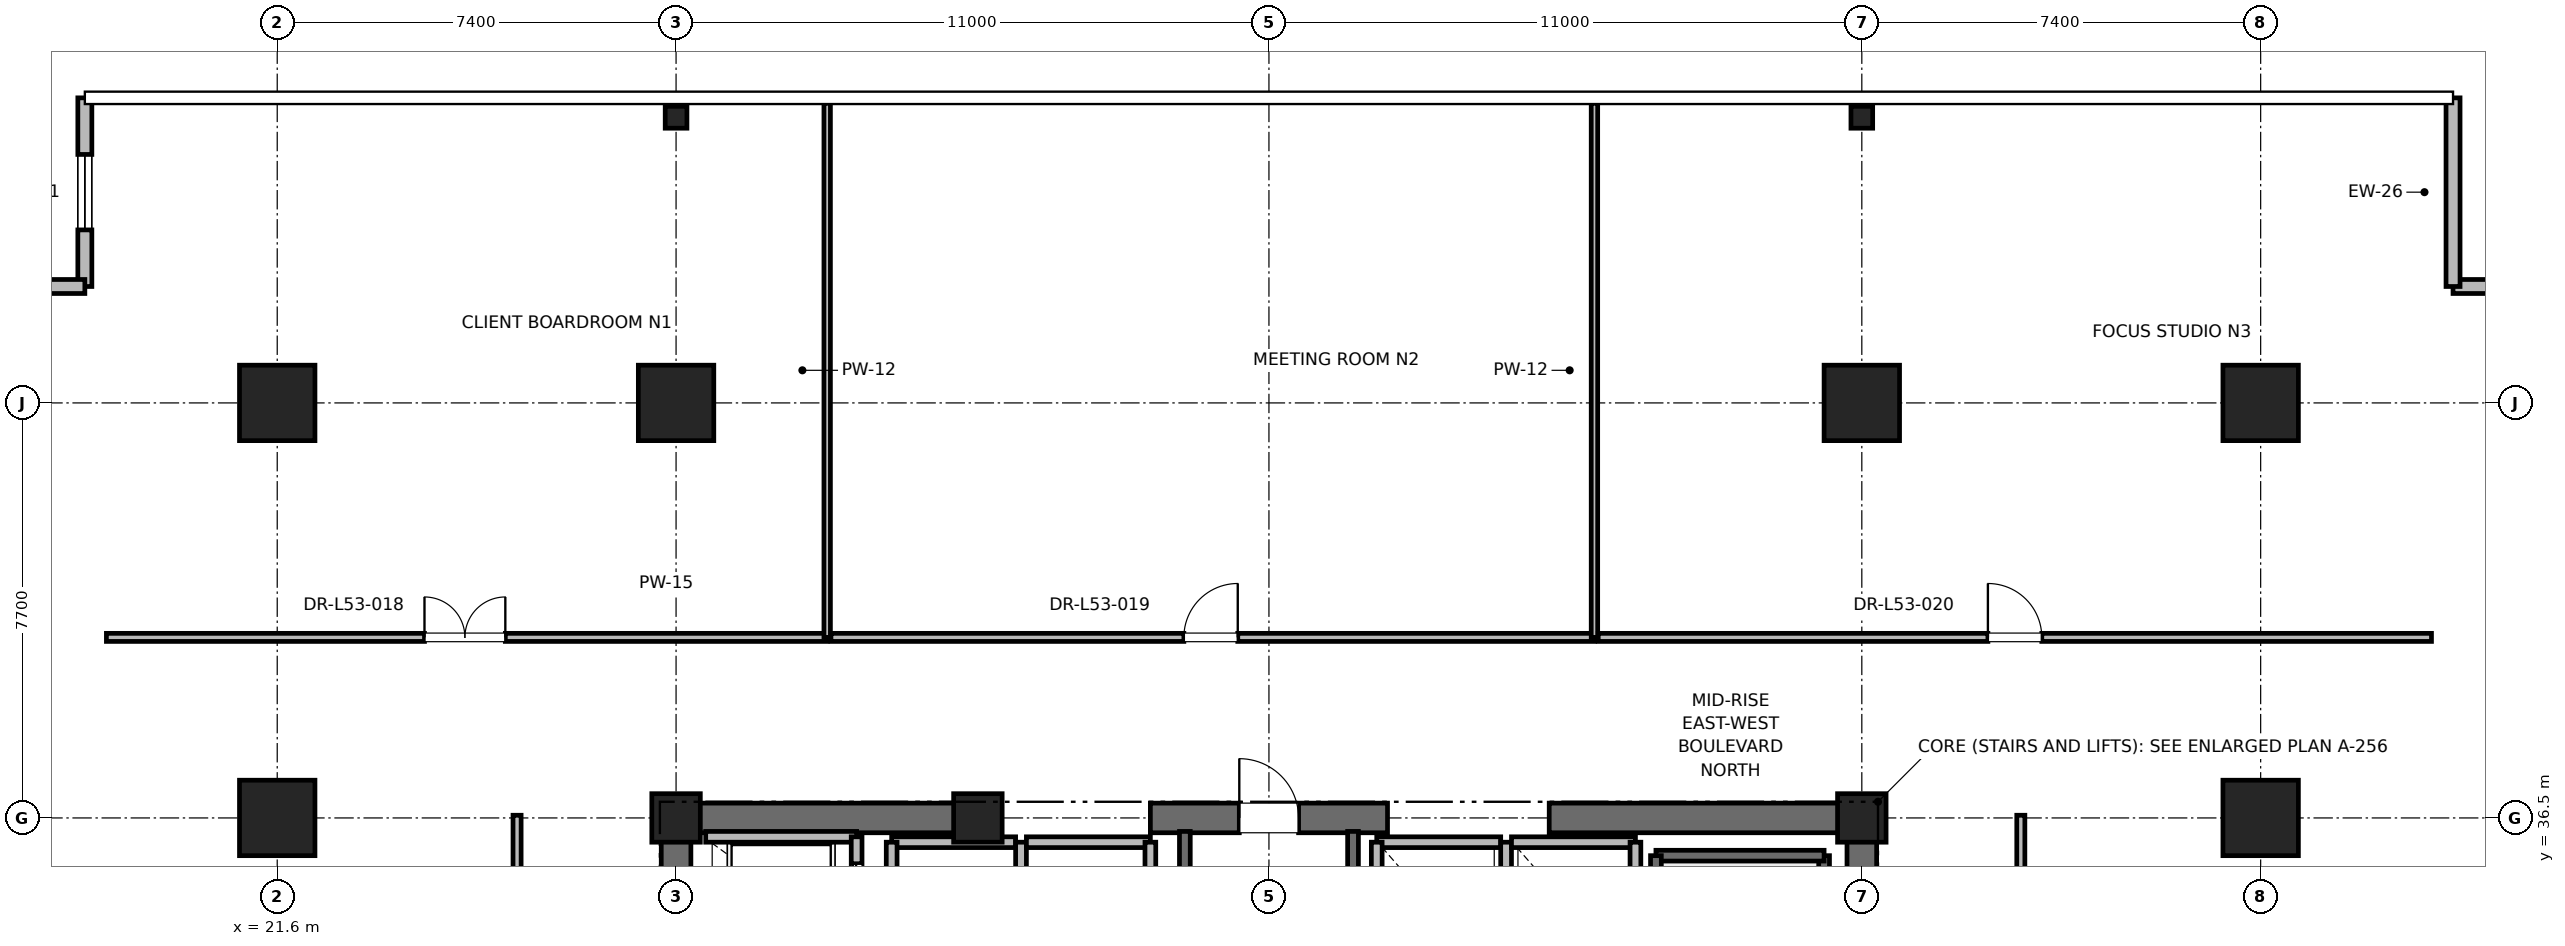
"""IFC4 building model, lengths in metres.
Left out: names, types, materials, properties, quantities, classifications, styles, units other than length and angle.
Written with IfcOpenShell. Run it as: python <this file> out.ifc"""

import sys

from ifc_helpers import new_model, si_unit, direction, frame, frame_2d, origin, origin_2d, place, context, subcontext, project, spatial, rectangle, i_section, extrude, element, fill, save


model = new_model("IFC4")
c1 = context("Model", 3, precision=1e-05, world=origin(), true_north=direction((0.0, 1.0)))
c2 = subcontext(c1, "Body", "Model", "MODEL_VIEW")
j1 = project(units=[si_unit("LENGTHUNIT", "METRE"), si_unit("PLANEANGLEUNIT", "RADIAN")], contexts=[c1])
p1 = place(None, origin())
s1 = spatial("IfcSite", under=j1, at=p1, CompositionType="ELEMENT")
p2 = place(p1, origin())
s2 = spatial("IfcBuilding", under=s1, at=p2, CompositionType="ELEMENT")
p3 = place(p2, frame((0.0, 0.0, 229.2)))
s3 = spatial("IfcBuildingStorey", under=s2, at=p3, CompositionType="ELEMENT", Elevation=229.2)
for number, where, z_axis, x_axis in (
    (1, (29.0, 44.2, 0.0), (0.0, 0.0, 1.0), (1.0, 0.0, 0.0)),
    (2, (51.0, 44.2, 0.0), (0.0, 0.0, 1.0), (1.0, 0.0, 0.0)),
    (3, (21.6, 36.5, 0.0), (0.0, 0.0, 1.0), (1.0, 0.0, 0.0)),
    (4, (58.4, 36.5, 0.0), (0.0, 0.0, 1.0), (1.0, 0.0, 0.0)),
    (5, (21.6, 44.2, 0.0), (0.0, 0.0, 1.0), (1.0, 0.0, 0.0)),
    (6, (58.4, 44.2, 0.0), (0.0, 0.0, 1.0), (1.0, 0.0, 0.0)),
):
    element("IfcColumn", number, at=place(p3, frame(where, z_axis=z_axis, x_axis=x_axis)), inside=s3, PredefinedType="COLUMN", context=c2, shape_type="SweptSolid", body=[
        extrude(rectangle(XDim=1.4, YDim=1.4, at=origin_2d()), origin(), (0.0, 0.0, 1.0), 4.0),
    ])
for number, where, z_axis, x_axis in (
    (7, (29.0, 49.5, 0.0), (0.0, 0.0, 1.0), (1.0, 0.0, 0.0)),
    (8, (51.0, 49.5, 0.0), (0.0, 0.0, 1.0), (1.0, 0.0, 0.0)),
):
    element("IfcColumn", number, at=place(p3, frame(where, z_axis=z_axis, x_axis=x_axis)), inside=s3, PredefinedType="COLUMN", context=c2, shape_type="SweptSolid", body=[
        extrude(i_section(OverallWidth=0.403, OverallDepth=0.406, WebThickness=0.027, FlangeThickness=0.043, FilletRadius=0.015, at=origin_2d()), origin(), (0.0, 0.0, 1.0), 4.0),
    ])
for number, where, z_axis, x_axis in (
    (9, (29.0, 36.5, 0.0), (0.0, 0.0, 1.0), (1.0, 0.0, 0.0)),
    (10, (51.0, 36.5, 0.0), (0.0, 0.0, 1.0), (1.0, 0.0, 0.0)),
    (11, (34.6, 36.5, 0.0), (0.0, 0.0, 1.0), (1.0, 0.0, 0.0)),
):
    element("IfcColumn", number, at=place(p3, frame(where, z_axis=z_axis, x_axis=x_axis)), inside=s3, PredefinedType="PILASTER", context=c2, shape_type="SweptSolid", body=[
        extrude(rectangle(XDim=0.9, YDim=0.9, at=origin_2d()), origin(), (0.0, 0.0, 1.0), 4.0),
    ])
p4 = place(p3, frame((29.0, 36.5, 0.0), z_axis=(0.0, 0.0, 1.0), x_axis=(1.0, 0.0, 0.0)))
e12 = element("IfcWall", 12, at=p4, inside=s3, PredefinedType="SHEAR", context=c2, shape_type="SweptSolid", body=[
    extrude(rectangle(XDim=5.8, YDim=0.55, at=frame_2d((2.9, 0.0))), origin(), (0.0, 0.0, 1.0), 3.7),
])
p5 = place(p3, frame((37.8, 36.5, 0.0), z_axis=(0.0, 0.0, 1.0), x_axis=(1.0, 0.0, 0.0)))
e13 = element("IfcWall", 13, at=p5, inside=s3, PredefinedType="SHEAR", context=c2, shape_type="SweptSolid", body=[
    extrude(rectangle(XDim=4.4, YDim=0.55, at=frame_2d((2.2, 0.0))), origin(), (0.0, 0.0, 1.0), 3.7),
])
p6 = place(p5, frame((1.65, 0.0, 0.0)))
e14 = element("IfcOpeningElement", 14, at=p6, cuts=e13, PredefinedType="OPENING", context=c2, shape_type="SweptSolid", body=[
    extrude(rectangle(XDim=1.1, YDim=2.15, at=frame_2d((0.55, 1.075))), frame((0.0, 0.275, 0.0), z_axis=(0.0, -1.0, 0.0), x_axis=(1.0, 0.0, 0.0)), (0.0, 0.0, 1.0), 0.55),
])
for number, where, z_axis, x_axis in (
    (15, (45.2, 36.5, 0.0), (0.0, 0.0, 1.0), (1.0, 0.0, 0.0)),
    (16, (29.0, 30.7, 0.0), (0.0, 0.0, 1.0), (0.0, 1.0, 0.0)),
):
    element("IfcWall", number, at=place(p3, frame(where, z_axis=z_axis, x_axis=x_axis)), inside=s3, PredefinedType="SHEAR", context=c2, shape_type="SweptSolid", body=[
        extrude(rectangle(XDim=5.8, YDim=0.55, at=frame_2d((2.9, 0.0))), origin(), (0.0, 0.0, 1.0), 3.7),
    ])
p7 = place(p3, frame((51.0, 27.7, 0.0), z_axis=(0.0, 0.0, 1.0), x_axis=(0.0, 1.0, 0.0)))
e17 = element("IfcWall", 17, at=p7, inside=s3, PredefinedType="SHEAR", context=c2, shape_type="SweptSolid", body=[
    extrude(rectangle(XDim=8.8, YDim=0.55, at=frame_2d((4.4, 0.0))), origin(), (0.0, 0.0, 1.0), 3.7),
])
p8 = place(p3, frame((65.969, 46.36, 0.0), z_axis=(0.0, 0.0, 1.0), x_axis=(-1.0, 0.0, 0.0)))
e18 = element("IfcWall", 18, at=p8, inside=s3, PredefinedType="PARAPET", context=c2, shape_type="SweptSolid", body=[
    extrude(rectangle(XDim=4.0, YDim=0.26, at=frame_2d((2.0, 0.0))), origin(), (0.0, 0.0, 1.0), 3.7),
])
p9 = place(p8, frame((1.3, 0.0, 0.85)))
e19 = element("IfcOpeningElement", 19, at=p9, cuts=e18, PredefinedType="OPENING", context=c2, shape_type="SweptSolid", body=[
    extrude(rectangle(XDim=1.4, YDim=2.0, at=frame_2d((0.7, 1.0))), frame((0.0, 0.13, 0.0), z_axis=(0.0, -1.0, 0.0), x_axis=(1.0, 0.0, 0.0)), (0.0, 0.0, 1.0), 0.26),
])
p10 = place(p3, frame((61.969, 46.36, 0.0), z_axis=(0.0, 0.0, 1.0), x_axis=(0.0, 1.0, 0.0)))
e20 = element("IfcWall", 20, at=p10, inside=s3, PredefinedType="PARAPET", context=c2, shape_type="SweptSolid", body=[
    extrude(rectangle(XDim=3.5, YDim=0.26, at=frame_2d((1.75, 0.0))), origin(), (0.0, 0.0, 1.0), 3.7),
])
p11 = place(p3, frame((18.031, 49.86, 0.0), z_axis=(0.0, 0.0, 1.0), x_axis=(0.0, -1.0, 0.0)))
e21 = element("IfcWall", 21, at=p11, inside=s3, PredefinedType="PARAPET", context=c2, shape_type="SweptSolid", body=[
    extrude(rectangle(XDim=3.5, YDim=0.26, at=frame_2d((1.75, 0.0))), origin(), (0.0, 0.0, 1.0), 3.7),
])
p12 = place(p11, frame((1.05, 0.0, 0.85)))
e22 = element("IfcOpeningElement", 22, at=p12, cuts=e21, PredefinedType="OPENING", context=c2, shape_type="SweptSolid", body=[
    extrude(rectangle(XDim=1.4, YDim=2.0, at=frame_2d((0.7, 1.0))), frame((0.0, 0.13, 0.0), z_axis=(0.0, -1.0, 0.0), x_axis=(1.0, 0.0, 0.0)), (0.0, 0.0, 1.0), 0.26),
])
p13 = place(p3, frame((18.031, 46.36, 0.0), z_axis=(0.0, 0.0, 1.0), x_axis=(-1.0, 0.0, 0.0)))
e23 = element("IfcWall", 23, at=p13, inside=s3, PredefinedType="PARAPET", context=c2, shape_type="SweptSolid", body=[
    extrude(rectangle(XDim=4.0, YDim=0.26, at=frame_2d((2.0, 0.0))), origin(), (0.0, 0.0, 1.0), 3.7),
])
p14 = place(p3, frame((50.3, 27.65, 0.0), z_axis=(0.0, 0.0, 1.0), x_axis=(0.0, 1.0, 0.0)))
e24 = element("IfcWall", 24, at=p14, inside=s3, PredefinedType="SOLIDWALL", context=c2, shape_type="SweptSolid", body=[
    extrude(rectangle(XDim=8.15, YDim=0.2, at=frame_2d((4.075, 0.0))), origin(), (0.0, 0.0, 1.0), 3.7),
])
p15 = place(p3, frame((47.18, 35.8, 0.0), z_axis=(0.0, 0.0, 1.0), x_axis=(1.0, 0.0, 0.0)))
e25 = element("IfcWall", 25, at=p15, inside=s3, PredefinedType="SOLIDWALL", context=c2, shape_type="SweptSolid", body=[
    extrude(rectangle(XDim=3.12, YDim=0.2, at=frame_2d((1.56, 0.0))), origin(), (0.0, 0.0, 1.0), 3.7),
])
p16 = place(p3, frame((47.18, 27.62, 0.0), z_axis=(0.0, 0.0, 1.0), x_axis=(0.0, 1.0, 0.0)))
e26 = element("IfcWall", 26, at=p16, inside=s3, PredefinedType="SOLIDWALL", context=c2, shape_type="SweptSolid", body=[
    extrude(rectangle(XDim=8.18, YDim=0.2, at=frame_2d((4.09, 0.0))), origin(), (0.0, 0.0, 1.0), 3.7),
])
p17 = place(p3, frame((38.44, 27.38, 0.0), z_axis=(0.0, 0.0, 1.0), x_axis=(0.0, 1.0, 0.0)))
e27 = element("IfcWall", 27, at=p17, inside=s3, PredefinedType="SOLIDWALL", context=c2, shape_type="SweptSolid", body=[
    extrude(rectangle(XDim=8.87, YDim=0.2, at=frame_2d((4.435, 0.0))), origin(), (0.0, 0.0, 1.0), 3.7),
])
p18 = place(p3, frame((41.56, 27.68, 0.0), z_axis=(0.0, 0.0, 1.0), x_axis=(0.0, 1.0, 0.0)))
e28 = element("IfcWall", 28, at=p18, inside=s3, PredefinedType="SOLIDWALL", context=c2, shape_type="SweptSolid", body=[
    extrude(rectangle(XDim=8.57, YDim=0.2, at=frame_2d((4.285, 0.0))), origin(), (0.0, 0.0, 1.0), 3.7),
])
p19 = place(p3, frame((32.35, 36.15, 0.0), z_axis=(0.0, 0.0, 1.0), x_axis=(-1.0, 0.0, 0.0)))
e29 = element("IfcWall", 29, at=p19, inside=s3, PredefinedType="SOLIDWALL", context=c2, shape_type="SweptSolid", body=[
    extrude(rectangle(XDim=2.8, YDim=0.2, at=frame_2d((1.4, 0.0))), origin(), (0.0, 0.0, 1.0), 2.987),
])
p20 = place(p3, frame((32.35, 34.05, 0.0), z_axis=(0.0, 0.0, 1.0), x_axis=(0.0, 1.0, 0.0)))
e30 = element("IfcWall", 30, at=p20, inside=s3, PredefinedType="SOLIDWALL", context=c2, shape_type="SweptSolid", body=[
    extrude(rectangle(XDim=2.1, YDim=0.2, at=frame_2d((1.05, 0.0))), origin(), (0.0, 0.0, 1.0), 3.7),
])
p21 = place(p20, frame((0.5, 0.0, 0.0)))
e31 = element("IfcOpeningElement", 31, at=p21, cuts=e30, PredefinedType="OPENING", context=c2, shape_type="SweptSolid", body=[
    extrude(rectangle(XDim=1.1, YDim=2.2, at=frame_2d((0.55, 1.1))), frame((0.0, 0.1, 0.0), z_axis=(0.0, -1.0, 0.0), x_axis=(1.0, 0.0, 0.0)), (0.0, 0.0, 1.0), 0.2),
])
p22 = place(p3, frame((35.3, 36.05, 0.0), z_axis=(0.0, 0.0, 1.0), x_axis=(-1.0, 0.0, 0.0)))
e32 = element("IfcWall", 32, at=p22, inside=s3, PredefinedType="SOLIDWALL", context=c2, shape_type="SweptSolid", body=[
    extrude(rectangle(XDim=2.3, YDim=0.2, at=frame_2d((1.15, 0.0))), origin(), (0.0, 0.0, 1.0), 2.68),
])
p23 = place(p3, frame((33.0, 36.05, 0.0), z_axis=(0.0, 0.0, 1.0), x_axis=(0.0, -1.0, 0.0)))
e33 = element("IfcWall", 33, at=p23, inside=s3, PredefinedType="SOLIDWALL", context=c2, shape_type="SweptSolid", body=[
    extrude(rectangle(XDim=2.6, YDim=0.2, at=frame_2d((1.3, 0.0))), origin(), (0.0, 0.0, 1.0), 3.7),
])
p24 = place(p3, frame((35.4, 33.45, 0.0), z_axis=(0.0, 0.0, 1.0), x_axis=(0.0, 1.0, 0.0)))
e34 = element("IfcWall", 34, at=p24, inside=s3, PredefinedType="SOLIDWALL", context=c2, shape_type="SweptSolid", body=[
    extrude(rectangle(XDim=2.6, YDim=0.2, at=frame_2d((1.3, 0.0))), origin(), (0.0, 0.0, 1.0), 2.68),
])
p25 = place(p3, frame((37.8, 36.05, 0.0), z_axis=(0.0, 0.0, 1.0), x_axis=(-1.0, 0.0, 0.0)))
e35 = element("IfcWall", 35, at=p25, inside=s3, PredefinedType="SOLIDWALL", context=c2, shape_type="SweptSolid", body=[
    extrude(rectangle(XDim=2.3, YDim=0.2, at=frame_2d((1.15, 0.0))), origin(), (0.0, 0.0, 1.0), 2.68),
])
p26 = place(p3, frame((37.8, 33.45, 0.0), z_axis=(0.0, 0.0, 1.0), x_axis=(0.0, 1.0, 0.0)))
e36 = element("IfcWall", 36, at=p26, inside=s3, PredefinedType="SOLIDWALL", context=c2, shape_type="SweptSolid", body=[
    extrude(rectangle(XDim=2.6, YDim=0.2, at=frame_2d((1.3, 0.0))), origin(), (0.0, 0.0, 1.0), 2.68),
])
p27 = place(p3, frame((44.3, 36.05, 0.0), z_axis=(0.0, 0.0, 1.0), x_axis=(-1.0, 0.0, 0.0)))
e37 = element("IfcWall", 37, at=p27, inside=s3, PredefinedType="SOLIDWALL", context=c2, shape_type="SweptSolid", body=[
    extrude(rectangle(XDim=2.3, YDim=0.2, at=frame_2d((1.15, 0.0))), origin(), (0.0, 0.0, 1.0), 2.68),
])
for number, where, z_axis, x_axis in (
    (38, (42.0, 36.05, 0.0), (0.0, 0.0, 1.0), (0.0, -1.0, 0.0)),
    (39, (44.4, 33.45, 0.0), (0.0, 0.0, 1.0), (0.0, 1.0, 0.0)),
):
    element("IfcWall", number, at=place(p3, frame(where, z_axis=z_axis, x_axis=x_axis)), inside=s3, PredefinedType="SOLIDWALL", context=c2, shape_type="SweptSolid", body=[
        extrude(rectangle(XDim=2.6, YDim=0.2, at=frame_2d((1.3, 0.0))), origin(), (0.0, 0.0, 1.0), 2.68),
    ])
p28 = place(p3, frame((46.8, 36.05, 0.0), z_axis=(0.0, 0.0, 1.0), x_axis=(-1.0, 0.0, 0.0)))
e40 = element("IfcWall", 40, at=p28, inside=s3, PredefinedType="SOLIDWALL", context=c2, shape_type="SweptSolid", body=[
    extrude(rectangle(XDim=2.3, YDim=0.2, at=frame_2d((1.15, 0.0))), origin(), (0.0, 0.0, 1.0), 2.68),
])
p29 = place(p3, frame((46.8, 33.45, 0.0), z_axis=(0.0, 0.0, 1.0), x_axis=(0.0, 1.0, 0.0)))
e41 = element("IfcWall", 41, at=p29, inside=s3, PredefinedType="SOLIDWALL", context=c2, shape_type="SweptSolid", body=[
    extrude(rectangle(XDim=2.6, YDim=0.2, at=frame_2d((1.3, 0.0))), origin(), (0.0, 0.0, 1.0), 3.7),
])
p30 = place(p3, frame((18.431, 39.85, 0.0), z_axis=(0.0, 0.0, 1.0), x_axis=(1.0, 0.0, 0.0)))
e42 = element("IfcWall", 42, at=p30, inside=s3, PredefinedType="PARTITIONING", context=c2, shape_type="SweptSolid", body=[
    extrude(rectangle(XDim=13.373, YDim=0.15, at=frame_2d((6.687, 0.0))), origin(), (0.0, 0.0, 1.0), 2.85),
])
p31 = place(p30, frame((5.902, 0.0, 0.0)))
e43 = element("IfcOpeningElement", 43, at=p31, cuts=e42, PredefinedType="OPENING", context=c2, shape_type="SweptSolid", body=[
    extrude(rectangle(XDim=1.5, YDim=2.25, at=frame_2d((0.75, 1.125))), frame((0.0, 0.075, 0.0), z_axis=(0.0, -1.0, 0.0), x_axis=(1.0, 0.0, 0.0)), (0.0, 0.0, 1.0), 0.15),
])
p32 = place(p3, frame((31.804, 39.85, 0.0), z_axis=(0.0, 0.0, 1.0), x_axis=(0.0, 1.0, 0.0)))
e44 = element("IfcWall", 44, at=p32, inside=s3, PredefinedType="PARTITIONING", context=c2, shape_type="SweptSolid", body=[
    extrude(rectangle(XDim=9.91, YDim=0.12, at=frame_2d((4.955, 0.0))), origin(), (0.0, 0.0, 1.0), 2.33),
])
p33 = place(p3, frame((31.874, 39.85, 0.0), z_axis=(0.0, 0.0, 1.0), x_axis=(1.0, 0.0, 0.0)))
e45 = element("IfcWall", 45, at=p33, inside=s3, PredefinedType="PARTITIONING", context=c2, shape_type="SweptSolid", body=[
    extrude(rectangle(XDim=14.166, YDim=0.15, at=frame_2d((7.083, 0.0))), origin(), (0.0, 0.0, 1.0), 2.85),
])
p34 = place(p33, frame((6.548, 0.0, 0.0)))
e46 = element("IfcOpeningElement", 46, at=p34, cuts=e45, PredefinedType="OPENING", context=c2, shape_type="SweptSolid", body=[
    extrude(rectangle(XDim=1.0, YDim=2.15, at=frame_2d((0.5, 1.075))), frame((0.0, 0.075, 0.0), z_axis=(0.0, -1.0, 0.0), x_axis=(1.0, 0.0, 0.0)), (0.0, 0.0, 1.0), 0.15),
])
p35 = place(p3, frame((46.039, 39.85, 0.0), z_axis=(0.0, 0.0, 1.0), x_axis=(0.0, 1.0, 0.0)))
e47 = element("IfcWall", 47, at=p35, inside=s3, PredefinedType="PARTITIONING", context=c2, shape_type="SweptSolid", body=[
    extrude(rectangle(XDim=9.91, YDim=0.12, at=frame_2d((4.955, 0.0))), origin(), (0.0, 0.0, 1.0), 2.33),
])
p36 = place(p3, frame((46.109, 39.85, 0.0), z_axis=(0.0, 0.0, 1.0), x_axis=(1.0, 0.0, 0.0)))
e48 = element("IfcWall", 48, at=p36, inside=s3, PredefinedType="PARTITIONING", context=c2, shape_type="SweptSolid", body=[
    extrude(rectangle(XDim=15.46, YDim=0.15, at=frame_2d((7.73, 0.0))), origin(), (0.0, 0.0, 1.0), 2.85),
])
p37 = place(p36, frame((7.23, 0.0, 0.0)))
e49 = element("IfcOpeningElement", 49, at=p37, cuts=e48, PredefinedType="OPENING", context=c2, shape_type="SweptSolid", body=[
    extrude(rectangle(XDim=1.0, YDim=2.15, at=frame_2d((0.5, 1.075))), frame((0.0, 0.075, 0.0), z_axis=(0.0, -1.0, 0.0), x_axis=(1.0, 0.0, 0.0)), (0.0, 0.0, 1.0), 0.15),
])
p38 = place(p3, frame((26.05, 30.647, 0.0), z_axis=(0.0, 0.0, 1.0), x_axis=(0.0, 1.0, 0.0)))
e50 = element("IfcWall", 50, at=p38, inside=s3, PredefinedType="PARTITIONING", context=c2, shape_type="SweptSolid", body=[
    extrude(rectangle(XDim=5.903, YDim=0.15, at=frame_2d((2.952, 0.0))), origin(), (0.0, 0.0, 1.0), 2.85),
])
p39 = place(p38, frame((2.376, 0.0, 0.0)))
e51 = element("IfcOpeningElement", 51, at=p39, cuts=e50, PredefinedType="OPENING", context=c2, shape_type="SweptSolid", body=[
    extrude(rectangle(XDim=1.0, YDim=2.15, at=frame_2d((0.5, 1.075))), frame((0.0, 0.075, 0.0), z_axis=(0.0, -1.0, 0.0), x_axis=(1.0, 0.0, 0.0)), (0.0, 0.0, 1.0), 0.15),
])
p40 = place(p3, frame((53.95, 31.371, 0.0), z_axis=(0.0, 0.0, 1.0), x_axis=(0.0, 1.0, 0.0)))
e52 = element("IfcWall", 52, at=p40, inside=s3, PredefinedType="PARTITIONING", context=c2, shape_type="SweptSolid", body=[
    extrude(rectangle(XDim=5.179, YDim=0.15, at=frame_2d((2.589, 0.0))), origin(), (0.0, 0.0, 1.0), 2.85),
])
p41 = place(p40, frame((2.014, 0.0, 0.0)))
e53 = element("IfcOpeningElement", 53, at=p41, cuts=e52, PredefinedType="OPENING", context=c2, shape_type="SweptSolid", body=[
    extrude(rectangle(XDim=1.0, YDim=2.15, at=frame_2d((0.5, 1.075))), frame((0.0, 0.075, 0.0), z_axis=(0.0, -1.0, 0.0), x_axis=(1.0, 0.0, 0.0)), (0.0, 0.0, 1.0), 0.15),
])
p42 = place(p12, origin())
e54 = element("IfcWindow", 54, at=p42, inside=s3, PartitioningType="SINGLE_PANEL", PredefinedType="WINDOW", context=c2, shape_type="SweptSolid", body=[
    extrude(rectangle(XDim=1.4, YDim=2.0, at=frame_2d((0.7, 1.0))), frame((0.0, 0.03, 0.0), z_axis=(0.0, -1.0, 0.0), x_axis=(1.0, 0.0, 0.0)), (0.0, 0.0, 1.0), 0.06),
])
fill(e22, e54)
p43 = place(p6, origin())
e55 = element("IfcDoor", 55, at=p43, inside=s3, OperationType="SINGLE_SWING_LEFT", PredefinedType="DOOR", context=c2, shape_type="SweptSolid", body=[
    extrude(rectangle(XDim=1.1, YDim=2.15, at=frame_2d((0.55, 1.075))), frame((0.0, 0.025, 0.0), z_axis=(0.0, -1.0, 0.0), x_axis=(1.0, 0.0, 0.0)), (0.0, 0.0, 1.0), 0.05),
])
fill(e14, e55)
p44 = place(p21, origin())
e56 = element("IfcDoor", 56, at=p44, inside=s3, OperationType="SLIDING_TO_RIGHT", PredefinedType="DOOR", context=c2, shape_type="SweptSolid", body=[
    extrude(rectangle(XDim=1.1, YDim=2.2, at=frame_2d((0.55, 1.1))), frame((0.0, 0.025, 0.0), z_axis=(0.0, -1.0, 0.0), x_axis=(1.0, 0.0, 0.0)), (0.0, 0.0, 1.0), 0.05),
])
fill(e31, e56)
p45 = place(p31, origin())
e57 = element("IfcDoor", 57, at=p45, inside=s3, OperationType="DOUBLE_DOOR_SINGLE_SWING", PredefinedType="DOOR", context=c2, shape_type="SweptSolid", body=[
    extrude(rectangle(XDim=1.5, YDim=2.25, at=frame_2d((0.75, 1.125))), frame((0.0, 0.025, 0.0), z_axis=(0.0, -1.0, 0.0), x_axis=(1.0, 0.0, 0.0)), (0.0, 0.0, 1.0), 0.05),
])
fill(e43, e57)
p46 = place(p34, origin())
e58 = element("IfcDoor", 58, at=p46, inside=s3, OperationType="SINGLE_SWING_RIGHT", PredefinedType="DOOR", context=c2, shape_type="SweptSolid", body=[
    extrude(rectangle(XDim=1.0, YDim=2.15, at=frame_2d((0.5, 1.075))), frame((0.0, 0.025, 0.0), z_axis=(0.0, -1.0, 0.0), x_axis=(1.0, 0.0, 0.0)), (0.0, 0.0, 1.0), 0.05),
])
fill(e46, e58)
p47 = place(p37, origin())
e59 = element("IfcDoor", 59, at=p47, inside=s3, OperationType="SINGLE_SWING_LEFT", PredefinedType="DOOR", context=c2, shape_type="SweptSolid", body=[
    extrude(rectangle(XDim=1.0, YDim=2.15, at=frame_2d((0.5, 1.075))), frame((0.0, 0.025, 0.0), z_axis=(0.0, -1.0, 0.0), x_axis=(1.0, 0.0, 0.0)), (0.0, 0.0, 1.0), 0.05),
])
fill(e49, e59)
save(model, sys.argv[1])
